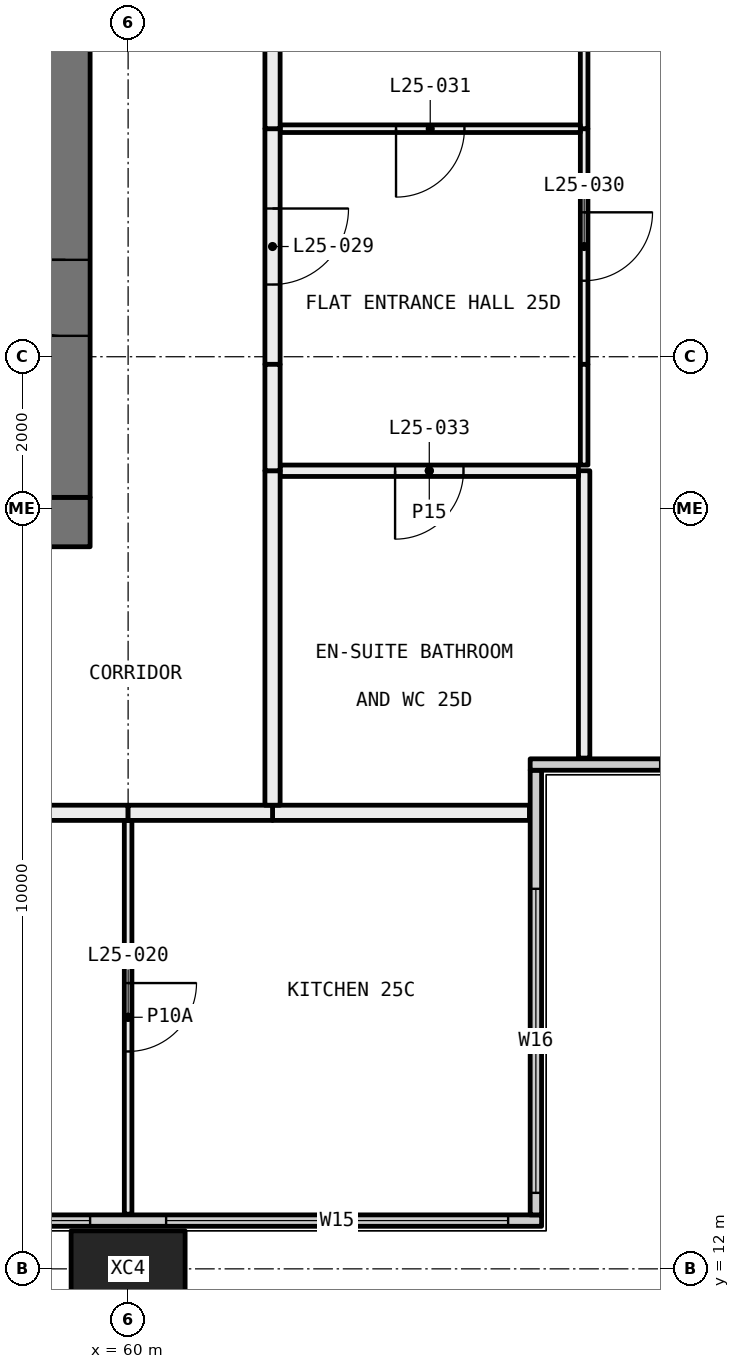
"""IFC4 building model, lengths in metres.
Left out: names, types, materials, properties, quantities, classifications, styles, units other than length and angle.
Written with IfcOpenShell. Run it as: python <this file> out.ifc"""

import sys

from ifc_helpers import new_model, si_unit, direction, frame, frame_2d, origin, origin_2d, place, context, subcontext, project, spatial, rectangle, hollow_rectangle, extrude, element, fill, save


model = new_model("IFC4")
c1 = context("Model", 3, precision=1e-05, world=origin(), true_north=direction((0.0, 1.0)))
c2 = subcontext(c1, "Body", "Model", "MODEL_VIEW")
j1 = project(units=[si_unit("LENGTHUNIT", "METRE"), si_unit("PLANEANGLEUNIT", "RADIAN")], contexts=[c1])
p1 = place(None, origin())
s1 = spatial("IfcSite", under=j1, at=p1, CompositionType="ELEMENT")
p2 = place(p1, origin())
s2 = spatial("IfcBuilding", under=s1, at=p2, CompositionType="ELEMENT")
p3 = place(p2, frame((0.0, 0.0, 100.05)))
s3 = spatial("IfcBuildingStorey", under=s2, at=p3, CompositionType="ELEMENT", Elevation=100.05)
p4 = place(p3, frame((60.0, 12.0, -0.4), z_axis=(0.0, 0.0, 1.0), x_axis=(1.0, 0.0, 0.0)))
e1 = element("IfcColumn", 1, at=p4, inside=s3, PredefinedType="COLUMN", context=c2, shape_type="SweptSolid", body=[
    extrude(hollow_rectangle(XDim=1.5, YDim=1.0, WallThickness=0.06, at=origin_2d()), origin(), (0.0, 0.0, 1.0), 3.45),
])
p5 = place(p3, frame((6.56, 12.635, 0.0), z_axis=(0.0, 0.0, 1.0), x_axis=(1.0, 0.0, 0.0)))
e2 = element("IfcWall", 2, at=p5, inside=s3, PredefinedType="ELEMENTEDWALL", context=c2, shape_type="SweptSolid", body=[
    extrude(rectangle(XDim=58.88, YDim=0.15, at=frame_2d((29.44, 0.0))), origin(), (0.0, 0.0, 1.0), 3.05),
])
p6 = place(p5, frame((0.44, 0.0, 0.45)))
e3 = element("IfcOpeningElement", 3, at=p6, cuts=e2, PredefinedType="OPENING", context=c2, shape_type="SweptSolid", body=[
    extrude(rectangle(XDim=4.5, YDim=2.55, at=frame_2d((2.25, 1.275))), frame((0.0, 0.085, 0.0), z_axis=(0.0, -1.0, 0.0), x_axis=(1.0, 0.0, 0.0)), (0.0, 0.0, 1.0), 0.17),
])
p7 = place(p5, frame((5.94, 0.0, 0.45)))
e4 = element("IfcOpeningElement", 4, at=p7, cuts=e2, PredefinedType="OPENING", context=c2, shape_type="SweptSolid", body=[
    extrude(rectangle(XDim=1.75, YDim=2.55, at=frame_2d((0.875, 1.275))), frame((0.0, 0.085, 0.0), z_axis=(0.0, -1.0, 0.0), x_axis=(1.0, 0.0, 0.0)), (0.0, 0.0, 1.0), 0.17),
])
p8 = place(p5, frame((15.19, 0.0, 0.45)))
e5 = element("IfcOpeningElement", 5, at=p8, cuts=e2, PredefinedType="OPENING", context=c2, shape_type="SweptSolid", body=[
    extrude(rectangle(XDim=1.75, YDim=2.55, at=frame_2d((0.875, 1.275))), frame((0.0, 0.085, 0.0), z_axis=(0.0, -1.0, 0.0), x_axis=(1.0, 0.0, 0.0)), (0.0, 0.0, 1.0), 0.17),
])
p9 = place(p5, frame((17.94, 0.0, 0.45)))
e6 = element("IfcOpeningElement", 6, at=p9, cuts=e2, PredefinedType="OPENING", context=c2, shape_type="SweptSolid", body=[
    extrude(rectangle(XDim=1.75, YDim=2.55, at=frame_2d((0.875, 1.275))), frame((0.0, 0.085, 0.0), z_axis=(0.0, -1.0, 0.0), x_axis=(1.0, 0.0, 0.0)), (0.0, 0.0, 1.0), 0.17),
])
p10 = place(p5, frame((27.19, 0.0, 0.45)))
e7 = element("IfcOpeningElement", 7, at=p10, cuts=e2, PredefinedType="OPENING", context=c2, shape_type="SweptSolid", body=[
    extrude(rectangle(XDim=1.75, YDim=2.55, at=frame_2d((0.875, 1.275))), frame((0.0, 0.085, 0.0), z_axis=(0.0, -1.0, 0.0), x_axis=(1.0, 0.0, 0.0)), (0.0, 0.0, 1.0), 0.17),
])
p11 = place(p5, frame((29.94, 0.0, 0.45)))
e8 = element("IfcOpeningElement", 8, at=p11, cuts=e2, PredefinedType="OPENING", context=c2, shape_type="SweptSolid", body=[
    extrude(rectangle(XDim=1.75, YDim=2.55, at=frame_2d((0.875, 1.275))), frame((0.0, 0.085, 0.0), z_axis=(0.0, -1.0, 0.0), x_axis=(1.0, 0.0, 0.0)), (0.0, 0.0, 1.0), 0.17),
])
p12 = place(p5, frame((39.19, 0.0, 0.45)))
e9 = element("IfcOpeningElement", 9, at=p12, cuts=e2, PredefinedType="OPENING", context=c2, shape_type="SweptSolid", body=[
    extrude(rectangle(XDim=1.75, YDim=2.55, at=frame_2d((0.875, 1.275))), frame((0.0, 0.085, 0.0), z_axis=(0.0, -1.0, 0.0), x_axis=(1.0, 0.0, 0.0)), (0.0, 0.0, 1.0), 0.17),
])
p13 = place(p5, frame((41.94, 0.0, 0.45)))
e10 = element("IfcOpeningElement", 10, at=p13, cuts=e2, PredefinedType="OPENING", context=c2, shape_type="SweptSolid", body=[
    extrude(rectangle(XDim=1.75, YDim=2.55, at=frame_2d((0.875, 1.275))), frame((0.0, 0.085, 0.0), z_axis=(0.0, -1.0, 0.0), x_axis=(1.0, 0.0, 0.0)), (0.0, 0.0, 1.0), 0.17),
])
p14 = place(p5, frame((51.19, 0.0, 0.45)))
e11 = element("IfcOpeningElement", 11, at=p14, cuts=e2, PredefinedType="OPENING", context=c2, shape_type="SweptSolid", body=[
    extrude(rectangle(XDim=1.75, YDim=2.55, at=frame_2d((0.875, 1.275))), frame((0.0, 0.085, 0.0), z_axis=(0.0, -1.0, 0.0), x_axis=(1.0, 0.0, 0.0)), (0.0, 0.0, 1.0), 0.17),
])
p15 = place(p5, frame((53.94, 0.0, 0.45)))
e12 = element("IfcOpeningElement", 12, at=p15, cuts=e2, PredefinedType="OPENING", context=c2, shape_type="SweptSolid", body=[
    extrude(rectangle(XDim=4.5, YDim=2.55, at=frame_2d((2.25, 1.275))), frame((0.0, 0.085, 0.0), z_axis=(0.0, -1.0, 0.0), x_axis=(1.0, 0.0, 0.0)), (0.0, 0.0, 1.0), 0.17),
])
p16 = place(p3, frame((65.365, 12.71, 0.0), z_axis=(0.0, 0.0, 1.0), x_axis=(0.0, 1.0, 0.0)))
e13 = element("IfcWall", 13, at=p16, inside=s3, PredefinedType="ELEMENTEDWALL", context=c2, shape_type="SweptSolid", body=[
    extrude(rectangle(XDim=5.85, YDim=0.15, at=frame_2d((2.925, 0.0))), origin(), (0.0, 0.0, 1.0), 3.05),
])
p17 = place(p16, frame((0.29, 0.0, 0.45)))
e14 = element("IfcOpeningElement", 14, at=p17, cuts=e13, PredefinedType="OPENING", context=c2, shape_type="SweptSolid", body=[
    extrude(rectangle(XDim=4.0, YDim=2.55, at=frame_2d((2.0, 1.275))), frame((0.0, 0.085, 0.0), z_axis=(0.0, -1.0, 0.0), x_axis=(1.0, 0.0, 0.0)), (0.0, 0.0, 1.0), 0.17),
])
p18 = place(p3, frame((65.29, 18.635, 0.0), z_axis=(0.0, 0.0, 1.0), x_axis=(1.0, 0.0, 0.0)))
e15 = element("IfcWall", 15, at=p18, inside=s3, PredefinedType="ELEMENTEDWALL", context=c2, shape_type="SweptSolid", body=[
    extrude(rectangle(XDim=6.15, YDim=0.15, at=frame_2d((3.075, 0.0))), origin(), (0.0, 0.0, 1.0), 3.05),
])
p19 = place(p18, frame((1.71, 0.0, 0.45)))
e16 = element("IfcOpeningElement", 16, at=p19, cuts=e15, PredefinedType="OPENING", context=c2, shape_type="SweptSolid", body=[
    extrude(rectangle(XDim=4.0, YDim=2.55, at=frame_2d((2.0, 1.275))), frame((0.0, 0.085, 0.0), z_axis=(0.0, -1.0, 0.0), x_axis=(1.0, 0.0, 0.0)), (0.0, 0.0, 1.0), 0.17),
])
p20 = place(p3, frame((60.0, 12.72, 0.0), z_axis=(0.0, 0.0, 1.0), x_axis=(0.0, 1.0, 0.0)))
e17 = element("IfcWall", 17, at=p20, inside=s3, PredefinedType="PARTITIONING", context=c2, shape_type="SweptSolid", body=[
    extrude(rectangle(XDim=5.18, YDim=0.1, at=frame_2d((2.59, 0.0))), origin(), (0.0, 0.0, 1.0), 3.05),
])
p21 = place(p20, frame((2.14, 0.0, 0.0)))
e18 = element("IfcOpeningElement", 18, at=p21, cuts=e17, PredefinedType="OPENING", context=c2, shape_type="SweptSolid", body=[
    extrude(rectangle(XDim=0.9, YDim=2.1, at=frame_2d((0.45, 1.05))), frame((0.0, 0.06, 0.0), z_axis=(0.0, -1.0, 0.0), x_axis=(1.0, 0.0, 0.0)), (0.0, 0.0, 1.0), 0.12),
])
p22 = place(p3, frame((60.0, 18.0, 0.0), z_axis=(0.0, 0.0, 1.0), x_axis=(-1.0, 0.0, 0.0)))
e19 = element("IfcWall", 19, at=p22, inside=s3, PredefinedType="PARTITIONING", context=c2, shape_type="SweptSolid", body=[
    extrude(rectangle(XDim=6.0, YDim=0.2, at=frame_2d((3.0, 0.0))), origin(), (0.0, 0.0, 1.0), 3.05),
])
p23 = place(p22, frame((2.5, 0.0, 0.0)))
e20 = element("IfcOpeningElement", 20, at=p23, cuts=e19, PredefinedType="OPENING", context=c2, shape_type="SweptSolid", body=[
    extrude(rectangle(XDim=1.0, YDim=2.1, at=frame_2d((0.5, 1.05))), frame((0.0, 0.11, 0.0), z_axis=(0.0, -1.0, 0.0), x_axis=(1.0, 0.0, 0.0)), (0.0, 0.0, 1.0), 0.22),
])
p24 = place(p3, frame((65.28, 18.0, 0.0), z_axis=(0.0, 0.0, 1.0), x_axis=(-1.0, 0.0, 0.0)))
e21 = element("IfcWall", 21, at=p24, inside=s3, PredefinedType="PARTITIONING", context=c2, shape_type="SweptSolid", body=[
    extrude(rectangle(XDim=3.38, YDim=0.2, at=frame_2d((1.69, 0.0))), origin(), (0.0, 0.0, 1.0), 3.05),
])
p25 = place(p3, frame((61.9, 18.0, 0.0), z_axis=(0.0, 0.0, 1.0), x_axis=(-1.0, 0.0, 0.0)))
e22 = element("IfcWall", 22, at=p25, inside=s3, PredefinedType="PARTITIONING", context=c2, shape_type="SweptSolid", body=[
    extrude(rectangle(XDim=1.9, YDim=0.2, at=frame_2d((0.95, 0.0))), origin(), (0.0, 0.0, 1.0), 3.05),
])
p26 = place(p3, frame((66.0, 22.5, 0.0), z_axis=(0.0, 0.0, 1.0), x_axis=(0.0, -1.0, 0.0)))
e23 = element("IfcWall", 23, at=p26, inside=s3, PredefinedType="PARTITIONING", context=c2, shape_type="SweptSolid", body=[
    extrude(rectangle(XDim=3.78, YDim=0.15, at=frame_2d((1.89, 0.0))), origin(), (0.0, 0.0, 1.0), 3.05),
])
p27 = place(p3, frame((66.0, 27.0, 0.0), z_axis=(0.0, 0.0, 1.0), x_axis=(0.0, -1.0, 0.0)))
e24 = element("IfcWall", 24, at=p27, inside=s3, PredefinedType="PARTITIONING", context=c2, shape_type="SweptSolid", body=[
    extrude(rectangle(XDim=3.1, YDim=0.1, at=frame_2d((1.55, 0.0))), origin(), (0.0, 0.0, 1.0), 2.45),
])
p28 = place(p27, frame((1.1, 0.0, 0.0)))
e25 = element("IfcOpeningElement", 25, at=p28, cuts=e24, PredefinedType="OPENING", context=c2, shape_type="SweptSolid", body=[
    extrude(rectangle(XDim=0.9, YDim=2.1, at=frame_2d((0.45, 1.05))), frame((0.0, 0.06, 0.0), z_axis=(0.0, -1.0, 0.0), x_axis=(1.0, 0.0, 0.0)), (0.0, 0.0, 1.0), 0.12),
])
p29 = place(p3, frame((66.0, 23.9, 0.0), z_axis=(0.0, 0.0, 1.0), x_axis=(0.0, -1.0, 0.0)))
e26 = element("IfcWall", 26, at=p29, inside=s3, PredefinedType="PARTITIONING", context=c2, shape_type="SweptSolid", body=[
    extrude(rectangle(XDim=1.325, YDim=0.1, at=frame_2d((0.663, 0.0))), origin(), (0.0, 0.0, 1.0), 3.05),
])
p30 = place(p3, frame((66.0, 29.95, 0.0), z_axis=(0.0, 0.0, 1.0), x_axis=(0.0, -1.0, 0.0)))
e27 = element("IfcWall", 27, at=p30, inside=s3, PredefinedType="PARTITIONING", context=c2, shape_type="SweptSolid", body=[
    extrude(rectangle(XDim=2.95, YDim=0.1, at=frame_2d((1.475, 0.0))), origin(), (0.0, 0.0, 1.0), 3.05),
])
p31 = place(p3, frame((65.925, 22.5, 0.0), z_axis=(0.0, 0.0, 1.0), x_axis=(-1.0, 0.0, 0.0)))
e28 = element("IfcWall", 28, at=p31, inside=s3, PredefinedType="PARTITIONING", context=c2, shape_type="SweptSolid", body=[
    extrude(rectangle(XDim=3.925, YDim=0.15, at=frame_2d((1.962, 0.0))), origin(), (0.0, 0.0, 1.0), 3.05),
])
p32 = place(p31, frame((1.512, 0.0, 0.0)))
e29 = element("IfcOpeningElement", 29, at=p32, cuts=e28, PredefinedType="OPENING", context=c2, shape_type="SweptSolid", body=[
    extrude(rectangle(XDim=0.9, YDim=2.1, at=frame_2d((0.45, 1.05))), frame((0.0, 0.085, 0.0), z_axis=(0.0, -1.0, 0.0), x_axis=(1.0, 0.0, 0.0)), (0.0, 0.0, 1.0), 0.17),
])
p33 = place(p3, frame((61.9, 22.5, 0.0), z_axis=(0.0, 0.0, 1.0), x_axis=(0.0, -1.0, 0.0)))
e30 = element("IfcWall", 30, at=p33, inside=s3, PredefinedType="PARTITIONING", context=c2, shape_type="SweptSolid", body=[
    extrude(rectangle(XDim=4.4, YDim=0.2, at=frame_2d((2.2, 0.0))), origin(), (0.0, 0.0, 1.0), 3.05),
])
p34 = place(p3, frame((65.95, 27.0, 0.0), z_axis=(0.0, 0.0, 1.0), x_axis=(-1.0, 0.0, 0.0)))
e31 = element("IfcWall", 31, at=p34, inside=s3, PredefinedType="PARTITIONING", context=c2, shape_type="SweptSolid", body=[
    extrude(rectangle(XDim=3.95, YDim=0.1, at=frame_2d((1.975, 0.0))), origin(), (0.0, 0.0, 1.0), 3.05),
])
p35 = place(p34, frame((1.525, 0.0, 0.0)))
e32 = element("IfcOpeningElement", 32, at=p35, cuts=e31, PredefinedType="OPENING", context=c2, shape_type="SweptSolid", body=[
    extrude(rectangle(XDim=0.9, YDim=2.1, at=frame_2d((0.45, 1.05))), frame((0.0, 0.06, 0.0), z_axis=(0.0, -1.0, 0.0), x_axis=(1.0, 0.0, 0.0)), (0.0, 0.0, 1.0), 0.12),
])
p36 = place(p3, frame((61.9, 27.0, 0.0), z_axis=(0.0, 0.0, 1.0), x_axis=(0.0, -1.0, 0.0)))
e33 = element("IfcWall", 33, at=p36, inside=s3, PredefinedType="PARTITIONING", context=c2, shape_type="SweptSolid", body=[
    extrude(rectangle(XDim=3.1, YDim=0.2, at=frame_2d((1.55, 0.0))), origin(), (0.0, 0.0, 1.0), 2.45),
])
p37 = place(p36, frame((1.05, 0.0, 0.0)))
e34 = element("IfcOpeningElement", 34, at=p37, cuts=e33, PredefinedType="OPENING", context=c2, shape_type="SweptSolid", body=[
    extrude(rectangle(XDim=1.0, YDim=2.1, at=frame_2d((0.5, 1.05))), frame((0.0, 0.11, 0.0), z_axis=(0.0, -1.0, 0.0), x_axis=(1.0, 0.0, 0.0)), (0.0, 0.0, 1.0), 0.22),
])
p38 = place(p3, frame((61.9, 23.9, 0.0), z_axis=(0.0, 0.0, 1.0), x_axis=(0.0, -1.0, 0.0)))
e35 = element("IfcWall", 35, at=p38, inside=s3, PredefinedType="PARTITIONING", context=c2, shape_type="SweptSolid", body=[
    extrude(rectangle(XDim=1.4, YDim=0.2, at=frame_2d((0.7, 0.0))), origin(), (0.0, 0.0, 1.0), 3.05),
])
p39 = place(p3, frame((61.9, 35.9, 0.0), z_axis=(0.0, 0.0, 1.0), x_axis=(0.0, -1.0, 0.0)))
e36 = element("IfcWall", 36, at=p39, inside=s3, PredefinedType="PARTITIONING", context=c2, shape_type="SweptSolid", body=[
    extrude(rectangle(XDim=8.9, YDim=0.2, at=frame_2d((4.45, 0.0))), origin(), (0.0, 0.0, 1.0), 3.05),
])
p40 = place(p3, frame((59.5, 21.825, 0.0), z_axis=(0.0, 0.0, 1.0), x_axis=(-1.0, 0.0, 0.0)))
e37 = element("IfcWall", 37, at=p40, inside=s3, PredefinedType="SHEAR", context=c2, shape_type="SweptSolid", body=[
    extrude(rectangle(XDim=11.0, YDim=0.65, at=frame_2d((5.5, 0.0))), origin(), (0.0, 0.0, 1.0), 3.05),
])
p41 = place(p3, frame((59.175, 22.15, 0.0), z_axis=(0.0, 0.0, 1.0), x_axis=(0.0, 1.0, 0.0)))
e38 = element("IfcWall", 38, at=p41, inside=s3, PredefinedType="SHEAR", context=c2, shape_type="SweptSolid", body=[
    extrude(rectangle(XDim=15.7, YDim=0.65, at=frame_2d((7.85, 0.0))), origin(), (0.0, 0.0, 1.0), 3.05),
])
p42 = place(p41, frame((8.3, 0.0, 0.0)))
e39 = element("IfcOpeningElement", 39, at=p42, cuts=e38, PredefinedType="OPENING", context=c2, shape_type="SweptSolid", body=[
    extrude(rectangle(XDim=1.6, YDim=2.1, at=frame_2d((0.8, 1.05))), frame((0.0, 0.335, 0.0), z_axis=(0.0, -1.0, 0.0), x_axis=(1.0, 0.0, 0.0)), (0.0, 0.0, 1.0), 0.67),
])
p43 = place(p41, frame((2.125, 0.0, 0.0)))
e40 = element("IfcOpeningElement", 40, at=p43, cuts=e38, PredefinedType="OPENING", context=c2, shape_type="SweptSolid", body=[
    extrude(rectangle(XDim=1.0, YDim=2.1, at=frame_2d((0.5, 1.05))), frame((0.0, 0.335, 0.0), z_axis=(0.0, -1.0, 0.0), x_axis=(1.0, 0.0, 0.0)), (0.0, 0.0, 1.0), 0.67),
])
p44 = place(p14, origin())
e41 = element("IfcWindow", 41, at=p44, inside=s3, PartitioningType="SINGLE_PANEL", PredefinedType="WINDOW", context=c2, shape_type="SweptSolid", body=[
    extrude(rectangle(XDim=1.75, YDim=2.55, at=frame_2d((0.875, 1.275))), frame((0.0, 0.03, 0.0), z_axis=(0.0, -1.0, 0.0), x_axis=(1.0, 0.0, 0.0)), (0.0, 0.0, 1.0), 0.06),
])
fill(e11, e41)
p45 = place(p15, origin())
e42 = element("IfcWindow", 42, at=p45, inside=s3, PartitioningType="SINGLE_PANEL", PredefinedType="WINDOW", context=c2, shape_type="SweptSolid", body=[
    extrude(rectangle(XDim=4.5, YDim=2.55, at=frame_2d((2.25, 1.275))), frame((0.0, 0.03, 0.0), z_axis=(0.0, -1.0, 0.0), x_axis=(1.0, 0.0, 0.0)), (0.0, 0.0, 1.0), 0.06),
])
fill(e12, e42)
p46 = place(p17, origin())
e43 = element("IfcWindow", 43, at=p46, inside=s3, PartitioningType="SINGLE_PANEL", PredefinedType="WINDOW", context=c2, shape_type="SweptSolid", body=[
    extrude(rectangle(XDim=4.0, YDim=2.55, at=frame_2d((2.0, 1.275))), frame((0.0, 0.03, 0.0), z_axis=(0.0, -1.0, 0.0), x_axis=(1.0, 0.0, 0.0)), (0.0, 0.0, 1.0), 0.06),
])
fill(e14, e43)
p47 = place(p21, frame((0.9, 0.0, 0.0), x_axis=(-1.0, 0.0, 0.0)))
e44 = element("IfcDoor", 44, at=p47, inside=s3, OperationType="SINGLE_SWING_RIGHT", PredefinedType="DOOR", context=c2, shape_type="SweptSolid", body=[
    extrude(rectangle(XDim=0.9, YDim=2.1, at=frame_2d((0.45, 1.05))), frame((0.0, 0.025, 0.0), z_axis=(0.0, -1.0, 0.0), x_axis=(1.0, 0.0, 0.0)), (0.0, 0.0, 1.0), 0.05),
])
fill(e18, e44)
p48 = place(p37, origin())
e45 = element("IfcDoor", 45, at=p48, inside=s3, OperationType="SINGLE_SWING_RIGHT", PredefinedType="DOOR", context=c2, shape_type="SweptSolid", body=[
    extrude(rectangle(XDim=1.0, YDim=2.1, at=frame_2d((0.5, 1.05))), frame((0.0, 0.025, 0.0), z_axis=(0.0, -1.0, 0.0), x_axis=(1.0, 0.0, 0.0)), (0.0, 0.0, 1.0), 0.05),
])
fill(e34, e45)
p49 = place(p28, origin())
e46 = element("IfcDoor", 46, at=p49, inside=s3, OperationType="SINGLE_SWING_RIGHT", PredefinedType="DOOR", context=c2, shape_type="SweptSolid", body=[
    extrude(rectangle(XDim=0.9, YDim=2.1, at=frame_2d((0.45, 1.05))), frame((0.0, 0.025, 0.0), z_axis=(0.0, -1.0, 0.0), x_axis=(1.0, 0.0, 0.0)), (0.0, 0.0, 1.0), 0.05),
])
fill(e25, e46)
p50 = place(p35, origin())
e47 = element("IfcDoor", 47, at=p50, inside=s3, OperationType="SINGLE_SWING_LEFT", PredefinedType="DOOR", context=c2, shape_type="SweptSolid", body=[
    extrude(rectangle(XDim=0.9, YDim=2.1, at=frame_2d((0.45, 1.05))), frame((0.0, 0.025, 0.0), z_axis=(0.0, -1.0, 0.0), x_axis=(1.0, 0.0, 0.0)), (0.0, 0.0, 1.0), 0.05),
])
fill(e32, e47)
p51 = place(p32, origin())
e48 = element("IfcDoor", 48, at=p51, inside=s3, OperationType="SINGLE_SWING_LEFT", PredefinedType="DOOR", context=c2, shape_type="SweptSolid", body=[
    extrude(rectangle(XDim=0.9, YDim=2.1, at=frame_2d((0.45, 1.05))), frame((0.0, 0.025, 0.0), z_axis=(0.0, -1.0, 0.0), x_axis=(1.0, 0.0, 0.0)), (0.0, 0.0, 1.0), 0.05),
])
fill(e29, e48)
p52 = place(p43, origin())
e49 = element("IfcDoor", 49, at=p52, inside=s3, OperationType="SINGLE_SWING_LEFT", PredefinedType="DOOR", context=c2, shape_type="SweptSolid", body=[
    extrude(rectangle(XDim=1.0, YDim=2.1, at=frame_2d((0.5, 1.05))), frame((0.0, 0.025, 0.0), z_axis=(0.0, -1.0, 0.0), x_axis=(1.0, 0.0, 0.0)), (0.0, 0.0, 1.0), 0.05),
])
fill(e40, e49)
save(model, sys.argv[1])
